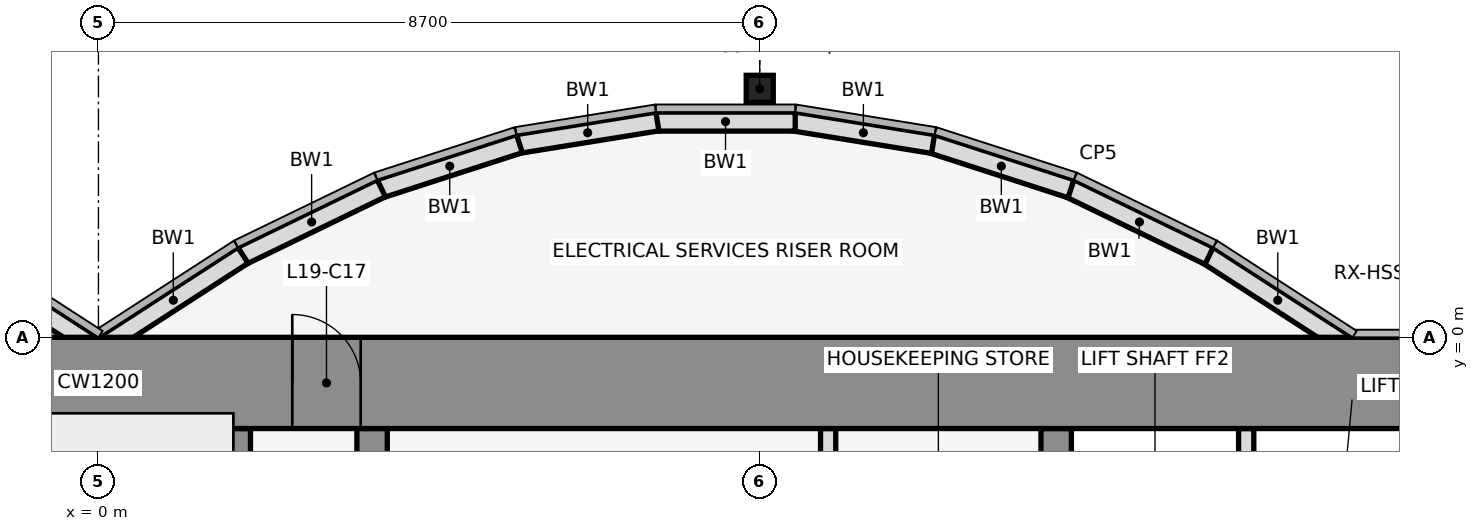
"""IFC4 building model, lengths in metres.
Left out: names, types, materials, properties, quantities, classifications, styles, units other than length and angle.
Written with IfcOpenShell. Run it as: python <this file> out.ifc"""

import sys

from ifc_helpers import new_model, si_unit, direction, frame, frame_2d, origin, origin_2d, place, context, subcontext, project, spatial, rectangle, hollow_rectangle, extrude, element, fill, save


model = new_model("IFC4")
c1 = context("Model", 3, precision=1e-05, world=origin(), true_north=direction((0.0, 1.0)))
c2 = subcontext(c1, "Body", "Model", "MODEL_VIEW")
j1 = project(units=[si_unit("LENGTHUNIT", "METRE"), si_unit("PLANEANGLEUNIT", "RADIAN")], contexts=[c1])
p1 = place(None, origin())
s1 = spatial("IfcSite", under=j1, at=p1, CompositionType="ELEMENT")
p2 = place(p1, origin())
s2 = spatial("IfcBuilding", under=s1, at=p2, CompositionType="ELEMENT")
p3 = place(p2, frame((0.0, 0.0, 94.0)))
s3 = spatial("IfcBuildingStorey", under=s2, at=p3, CompositionType="ELEMENT", Elevation=94.0)
p4 = place(p3, frame((8.7, 3.269, 0.0), z_axis=(0.0, 0.0, 1.0), x_axis=(1.0, 0.0, 0.0)))
e1 = element("IfcColumn", 1, at=p4, inside=s3, PredefinedType="COLUMN", context=c2, shape_type="SweptSolid", body=[
    extrude(hollow_rectangle(XDim=0.356, YDim=0.356, WallThickness=0.012, at=origin_2d()), origin(), (0.0, 0.0, 1.0), 4.1),
])
p5 = place(p3, frame((16.432, -0.105, 0.0), z_axis=(0.0, 0.0, 1.0), x_axis=(-0.83981312244, 0.542875602121, 0.0)))
e2 = element("IfcWall", 2, at=p5, inside=s3, PredefinedType="STANDARD", context=c2, shape_type="SweptSolid", body=[
    extrude(rectangle(XDim=2.183, YDim=0.25, at=frame_2d((1.091, 0.0))), origin(), (0.0, 0.0, 1.0), 3.95),
])
p6 = place(p3, frame((14.612, 1.073, 0.0), z_axis=(0.0, 0.0, 1.0), x_axis=(-0.89982408427, 0.436252928206, 0.0)))
e3 = element("IfcWall", 3, at=p6, inside=s3, PredefinedType="STANDARD", context=c2, shape_type="SweptSolid", body=[
    extrude(rectangle(XDim=2.038, YDim=0.25, at=frame_2d((1.019, 0.0))), origin(), (0.0, 0.0, 1.0), 3.95),
])
p7 = place(p3, frame((12.795, 1.955, 0.0), z_axis=(0.0, 0.0, 1.0), x_axis=(-0.951495806175, 0.307661714928, 0.0)))
e4 = element("IfcWall", 4, at=p7, inside=s3, PredefinedType="STANDARD", context=c2, shape_type="SweptSolid", body=[
    extrude(rectangle(XDim=1.927, YDim=0.25, at=frame_2d((0.963, 0.0))), origin(), (0.0, 0.0, 1.0), 3.95),
])
p8 = place(p3, frame((10.98, 2.543, 0.0), z_axis=(0.0, 0.0, 1.0), x_axis=(-0.987181718931, 0.159600293885, 0.0)))
e5 = element("IfcWall", 5, at=p8, inside=s3, PredefinedType="STANDARD", context=c2, shape_type="SweptSolid", body=[
    extrude(rectangle(XDim=1.857, YDim=0.25, at=frame_2d((0.929, 0.0))), origin(), (0.0, 0.0, 1.0), 3.95),
])
p9 = place(p3, frame((9.167, 2.838, 0.0), z_axis=(0.0, 0.0, 1.0), x_axis=(-1.0, 0.0, 0.0)))
e6 = element("IfcWall", 6, at=p9, inside=s3, PredefinedType="STANDARD", context=c2, shape_type="SweptSolid", body=[
    extrude(rectangle(XDim=1.833, YDim=0.25, at=frame_2d((0.917, 0.0))), origin(), (0.0, 0.0, 1.0), 3.95),
])
p10 = place(p3, frame((7.353, 2.84, 0.0), z_axis=(0.0, 0.0, 1.0), x_axis=(-0.987181718931, -0.159600293885, 0.0)))
e7 = element("IfcWall", 7, at=p10, inside=s3, PredefinedType="STANDARD", context=c2, shape_type="SweptSolid", body=[
    extrude(rectangle(XDim=1.857, YDim=0.25, at=frame_2d((0.929, 0.0))), origin(), (0.0, 0.0, 1.0), 3.95),
])
p11 = place(p3, frame((5.538, 2.548, 0.0), z_axis=(0.0, 0.0, 1.0), x_axis=(-0.951495806175, -0.307661714928, 0.0)))
e8 = element("IfcWall", 8, at=p11, inside=s3, PredefinedType="STANDARD", context=c2, shape_type="SweptSolid", body=[
    extrude(rectangle(XDim=1.927, YDim=0.25, at=frame_2d((0.963, 0.0))), origin(), (0.0, 0.0, 1.0), 3.95),
])
p12 = place(p3, frame((3.721, 1.962, 0.0), z_axis=(0.0, 0.0, 1.0), x_axis=(-0.89982408427, -0.436252928206, 0.0)))
e9 = element("IfcWall", 9, at=p12, inside=s3, PredefinedType="STANDARD", context=c2, shape_type="SweptSolid", body=[
    extrude(rectangle(XDim=2.038, YDim=0.25, at=frame_2d((1.019, 0.0))), origin(), (0.0, 0.0, 1.0), 3.95),
])
for number, where, z_axis, x_axis in (
    (10, (1.901, 1.08, 0.0), (0.0, 0.0, 1.0), (-0.84, -0.543, 0.0)),
    (11, (-0.068, -0.105, 0.0), (0.0, 0.0, 1.0), (-0.84, 0.543, 0.0)),
):
    element("IfcWall", number, at=place(p3, frame(where, z_axis=z_axis, x_axis=x_axis)), inside=s3, PredefinedType="STANDARD", context=c2, shape_type="SweptSolid", body=[
        extrude(rectangle(XDim=2.183, YDim=0.25, at=frame_2d((1.091, 0.0))), origin(), (0.0, 0.0, 1.0), 3.95),
    ])
p13 = place(p3, frame((1.8, -11.8, 0.0), z_axis=(0.0, 0.0, 1.0), x_axis=(0.0, 1.0, 0.0)))
e12 = element("IfcWall", 12, at=p13, inside=s3, PredefinedType="SHEAR", context=c2, shape_type="SweptSolid", body=[
    extrude(rectangle(XDim=10.6, YDim=0.4, at=frame_2d((5.3, 0.0))), origin(), (0.0, 0.0, 1.0), 4.1),
])
p14 = place(p3, frame((3.6, -11.8, 0.0), z_axis=(0.0, 0.0, 1.0), x_axis=(0.0, 1.0, 0.0)))
e13 = element("IfcWall", 13, at=p14, inside=s3, PredefinedType="SHEAR", context=c2, shape_type="SweptSolid", body=[
    extrude(rectangle(XDim=10.6, YDim=0.4, at=frame_2d((5.3, 0.0))), origin(), (0.0, 0.0, 1.0), 4.1),
])
p15 = place(p14, frame((1.35, 0.0, 0.0)))
e14 = element("IfcOpeningElement", 14, at=p15, cuts=e13, PredefinedType="OPENING", context=c2, shape_type="SweptSolid", body=[
    extrude(rectangle(XDim=0.9, YDim=2.1, at=frame_2d((0.45, 1.05))), frame((0.0, 0.212, 0.0), z_axis=(0.0, -1.0, 0.0), x_axis=(1.0, 0.0, 0.0)), (0.0, 0.0, 1.0), 0.424),
])
p16 = place(p3, frame((9.6, -4.6, 0.0), z_axis=(0.0, 0.0, 1.0), x_axis=(0.0, 1.0, 0.0)))
e15 = element("IfcWall", 15, at=p16, inside=s3, PredefinedType="PARTITIONING", context=c2, shape_type="SweptSolid", body=[
    extrude(rectangle(XDim=3.4, YDim=0.2, at=frame_2d((1.7, 0.0))), origin(), (0.0, 0.0, 1.0), 3.018),
])
p17 = place(p3, frame((12.6, -11.8, 0.0), z_axis=(0.0, 0.0, 1.0), x_axis=(0.0, 1.0, 0.0)))
e16 = element("IfcWall", 16, at=p17, inside=s3, PredefinedType="SHEAR", context=c2, shape_type="SweptSolid", body=[
    extrude(rectangle(XDim=10.6, YDim=0.4, at=frame_2d((5.3, 0.0))), origin(), (0.0, 0.0, 1.0), 4.1),
])
p18 = place(p17, frame((4.75, 0.0, 0.0)))
e17 = element("IfcOpeningElement", 17, at=p18, cuts=e16, PredefinedType="OPENING", context=c2, shape_type="SweptSolid", body=[
    extrude(rectangle(XDim=1.1, YDim=2.1, at=frame_2d((0.55, 1.05))), frame((0.0, 0.212, 0.0), z_axis=(0.0, -1.0, 0.0), x_axis=(1.0, 0.0, 0.0)), (0.0, 0.0, 1.0), 0.424),
])
p19 = place(p3, frame((15.1, -4.6, 0.0), z_axis=(0.0, 0.0, 1.0), x_axis=(0.0, 1.0, 0.0)))
e18 = element("IfcWall", 18, at=p19, inside=s3, PredefinedType="PARTITIONING", context=c2, shape_type="SweptSolid", body=[
    extrude(rectangle(XDim=3.4, YDim=0.2, at=frame_2d((1.7, 0.0))), origin(), (0.0, 0.0, 1.0), 3.018),
])
p20 = place(p3, frame((-22.0, -0.6, 0.0), z_axis=(0.0, 0.0, 1.0), x_axis=(1.0, 0.0, 0.0)))
e19 = element("IfcWall", 19, at=p20, inside=s3, PredefinedType="SHEAR", context=c2, shape_type="SweptSolid", body=[
    extrude(rectangle(XDim=44.0, YDim=1.2, at=frame_2d((22.0, 0.0))), origin(), (0.0, 0.0, 1.0), 4.1),
])
p21 = place(p20, frame((18.55, 0.0, 0.0)))
e20 = element("IfcOpeningElement", 20, at=p21, cuts=e19, PredefinedType="OPENING", context=c2, shape_type="SweptSolid", body=[
    extrude(rectangle(XDim=0.9, YDim=2.1, at=frame_2d((0.45, 1.05))), frame((0.0, 0.612, 0.0), z_axis=(0.0, -1.0, 0.0), x_axis=(1.0, 0.0, 0.0)), (0.0, 0.0, 1.0), 1.224),
])
p22 = place(p20, frame((24.55, 0.0, 0.0)))
e21 = element("IfcOpeningElement", 21, at=p22, cuts=e19, PredefinedType="OPENING", context=c2, shape_type="SweptSolid", body=[
    extrude(rectangle(XDim=0.9, YDim=2.1, at=frame_2d((0.45, 1.05))), frame((0.0, 0.612, 0.0), z_axis=(0.0, -1.0, 0.0), x_axis=(1.0, 0.0, 0.0)), (0.0, 0.0, 1.0), 1.224),
])
p23 = place(p22, origin())
e22 = element("IfcDoor", 22, at=p23, inside=s3, OperationType="SINGLE_SWING_LEFT", PredefinedType="DOOR", context=c2, shape_type="SweptSolid", body=[
    extrude(rectangle(XDim=0.9, YDim=2.1, at=frame_2d((0.45, 1.05))), frame((0.0, 0.025, 0.0), z_axis=(0.0, -1.0, 0.0), x_axis=(1.0, 0.0, 0.0)), (0.0, 0.0, 1.0), 0.05),
])
fill(e21, e22)
save(model, sys.argv[1])
